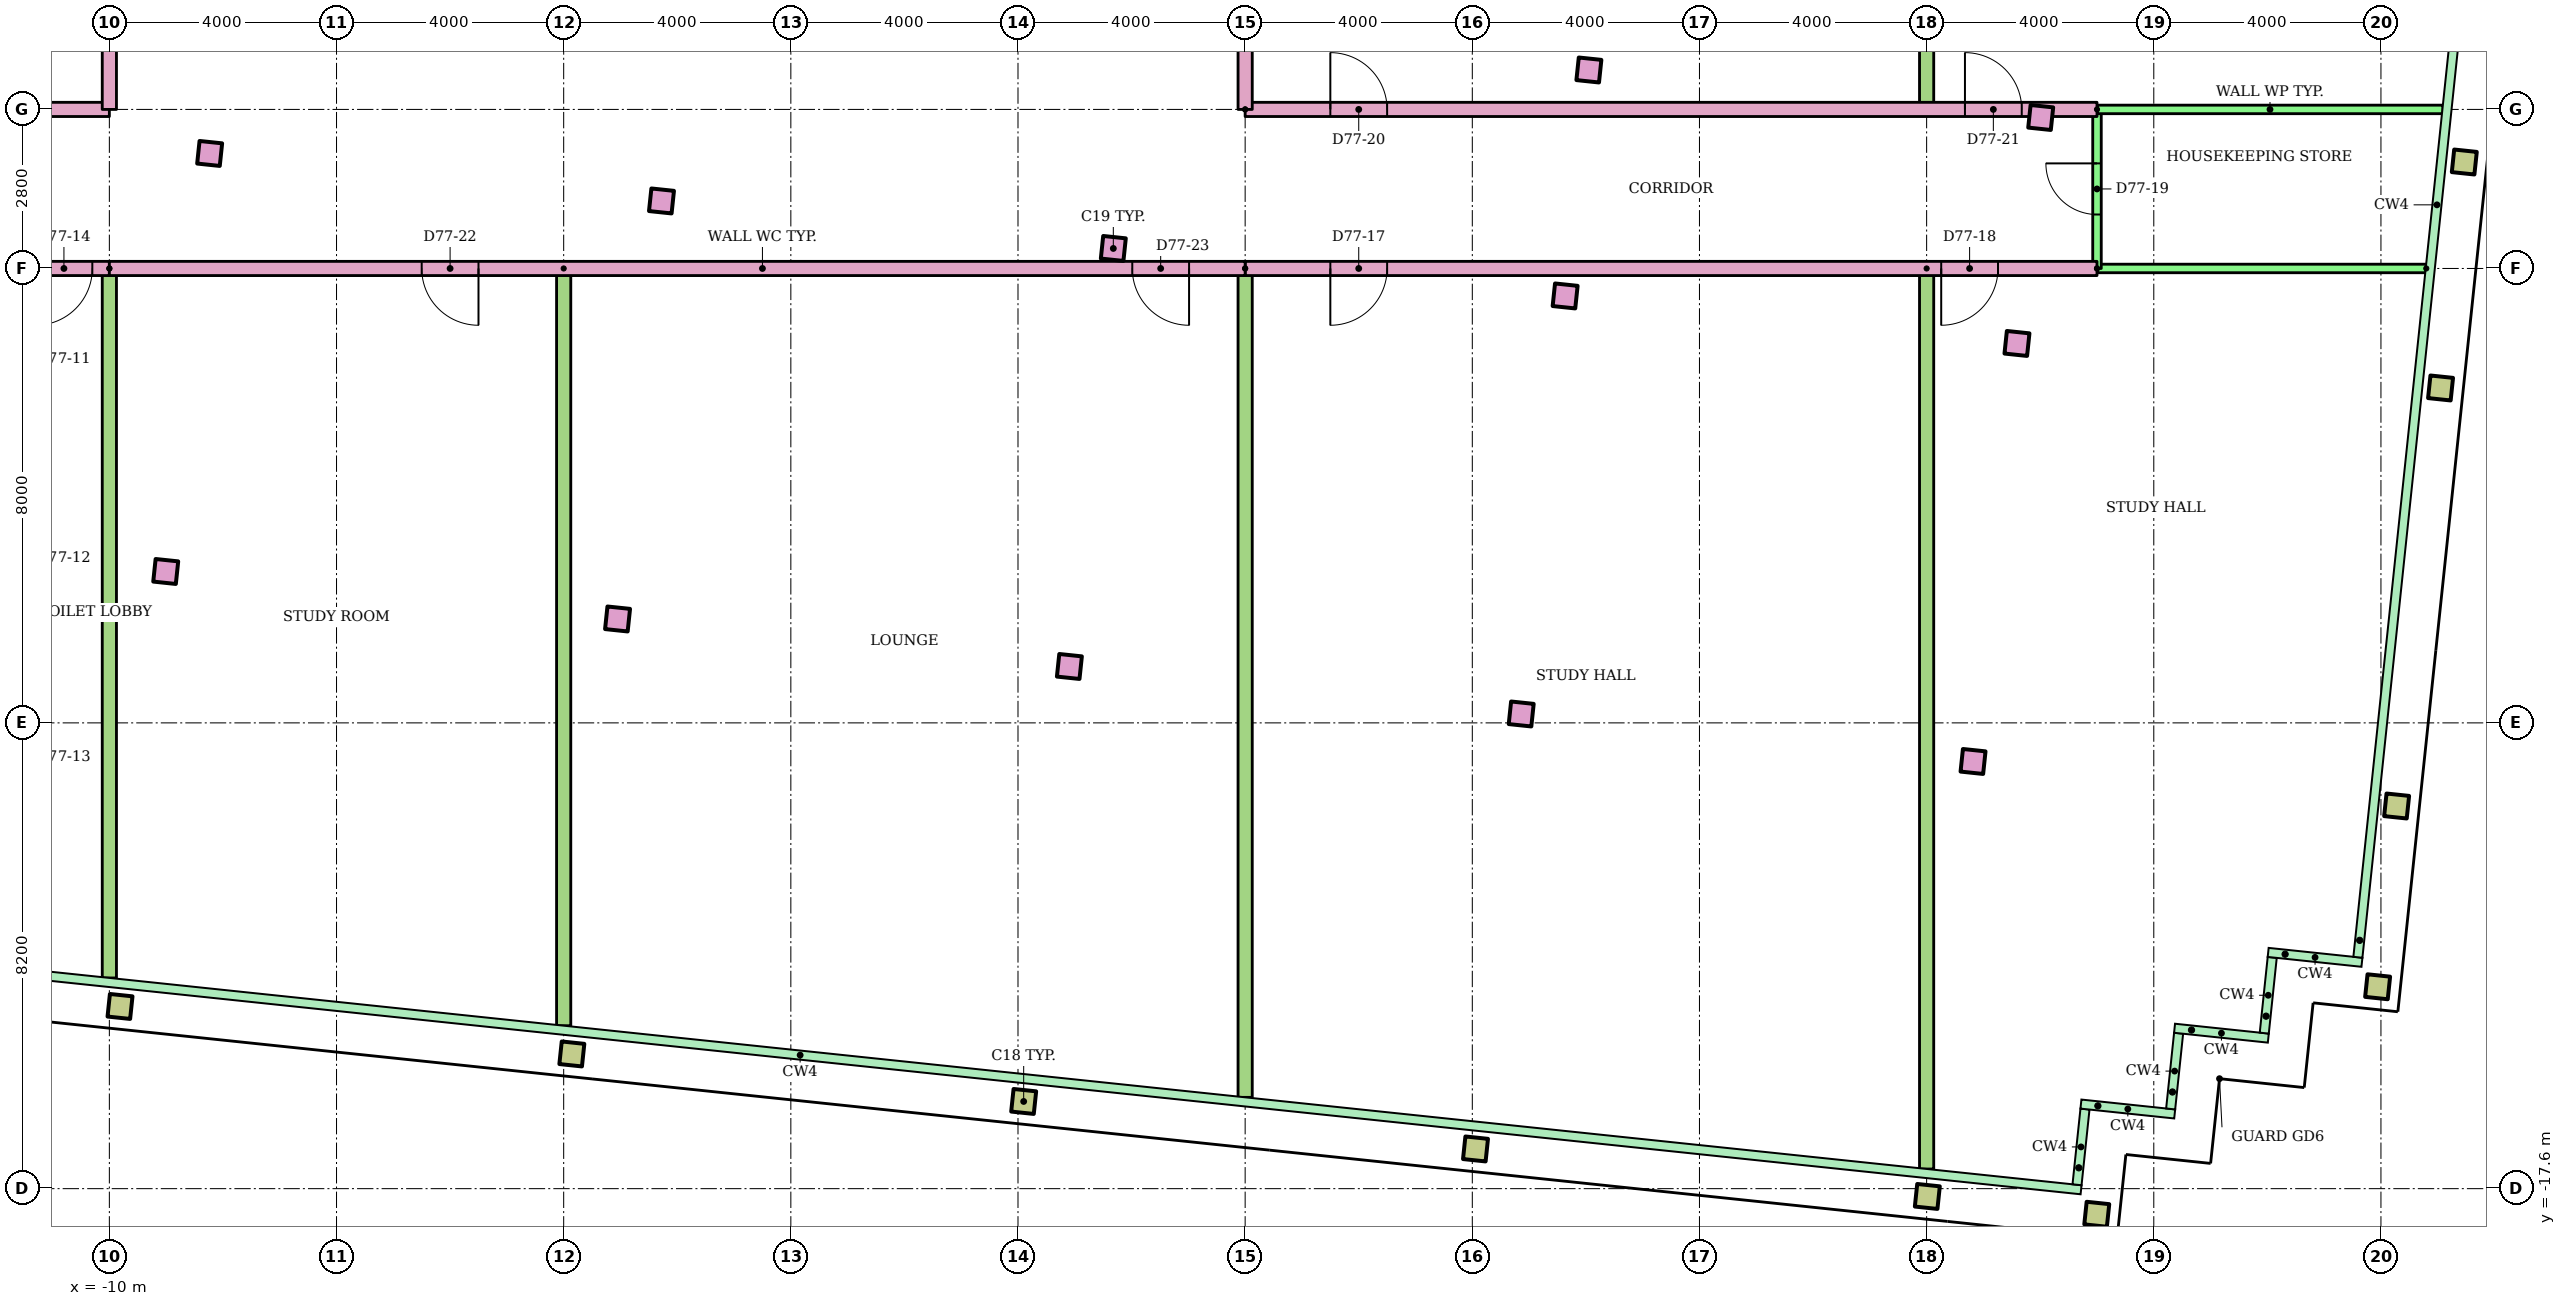
"""IFC4 building model, lengths in metres.
Left out: names, types, materials, properties, quantities, classifications, styles, units other than length and angle.
Written with IfcOpenShell. Run it as: python <this file> out.ifc"""

import sys

from ifc_helpers import new_model, si_unit, direction, frame, frame_2d, origin, origin_2d, place, context, subcontext, project, spatial, rectangle, hollow_rectangle, extrude, element, fill, save


model = new_model("IFC4")
c1 = context("Model", 3, precision=1e-05, world=origin(), true_north=direction((0.0, 1.0)))
c2 = subcontext(c1, "Body", "Model", "MODEL_VIEW")
j1 = project(units=[si_unit("LENGTHUNIT", "METRE"), si_unit("PLANEANGLEUNIT", "RADIAN")], contexts=[c1])
p1 = place(None, origin())
s1 = spatial("IfcSite", under=j1, at=p1, CompositionType="ELEMENT")
p2 = place(p1, origin())
s2 = spatial("IfcBuilding", under=s1, at=p2, CompositionType="ELEMENT")
p3 = place(p2, frame((0.0, 0.0, 298.3)))
s3 = spatial("IfcBuildingStorey", under=s2, at=p3, CompositionType="ELEMENT", Elevation=298.3)
for number, where, z_axis, x_axis in (
    (1, (-9.812, -14.392, 0.0), (0.0, 0.0, 1.0), (0.995, -0.105, 0.0)),
    (2, (-1.856, -15.229, 0.0), (0.0, 0.0, 1.0), (0.995, -0.105, 0.0)),
    (3, (6.1, -16.065, 0.0), (0.0, 0.0, 1.0), (0.995, -0.105, 0.0)),
    (4, (14.056, -16.901, 0.0), (0.0, 0.0, 1.0), (0.995, -0.105, 0.0)),
    (5, (22.012, -17.737, 0.0), (0.0, 0.0, 1.0), (0.995, -0.105, 0.0)),
    (6, (24.996, -18.051, 0.0), (0.0, 0.0, 1.0), (0.995, -0.105, 0.0)),
    (7, (29.942, -14.046, 0.0), (0.0, 0.0, 1.0), (0.995, -0.105, 0.0)),
):
    element("IfcColumn", number, at=place(p3, frame(where, z_axis=z_axis, x_axis=x_axis)), inside=s3, PredefinedType="COLUMN", context=c2, shape_type="SweptSolid", body=[
        extrude(hollow_rectangle(XDim=0.4, YDim=0.4, WallThickness=0.02, at=origin_2d()), origin(), (0.0, 0.0, 1.0), 3.4),
    ])
for number, where, z_axis, x_axis in (
    (8, (-9.007, -6.735, 0.0), (0.0, 0.0, 1.0), (0.995, -0.105, 0.0)),
    (9, (-1.051, -7.571, 0.0), (0.0, 0.0, 1.0), (0.995, -0.105, 0.0)),
    (10, (6.905, -8.407, 0.0), (0.0, 0.0, 1.0), (0.995, -0.105, 0.0)),
    (11, (14.861, -9.243, 0.0), (0.0, 0.0, 1.0), (0.995, -0.105, 0.0)),
    (12, (22.817, -10.08, 0.0), (0.0, 0.0, 1.0), (0.995, -0.105, 0.0)),
):
    element("IfcColumn", number, at=place(p3, frame(where, z_axis=z_axis, x_axis=x_axis)), inside=s3, PredefinedType="COLUMN", context=c2, shape_type="SweptSolid", body=[
        extrude(rectangle(XDim=0.4, YDim=0.4, at=origin_2d()), origin(), (0.0, 0.0, 1.0), 3.4),
    ])
p4 = place(p3, frame((30.276, -10.864, 0.0), z_axis=(0.0, 0.0, 1.0), x_axis=(0.994521895368, -0.104528463268, 0.0)))
e13 = element("IfcColumn", 13, at=p4, inside=s3, PredefinedType="COLUMN", context=c2, shape_type="SweptSolid", body=[
    extrude(hollow_rectangle(XDim=0.4, YDim=0.4, WallThickness=0.02, at=origin_2d()), origin(), (0.0, 0.0, 1.0), 3.4),
])
for number, where, z_axis, x_axis in (
    (14, (-8.234, 0.625, 0.0), (0.0, 0.0, 1.0), (0.995, -0.105, 0.0)),
    (15, (-0.278, -0.211, 0.0), (0.0, 0.0, 1.0), (0.995, -0.105, 0.0)),
    (16, (7.678, -1.048, 0.0), (0.0, 0.0, 1.0), (0.995, -0.105, 0.0)),
    (17, (15.635, -1.884, 0.0), (0.0, 0.0, 1.0), (0.995, -0.105, 0.0)),
    (18, (23.591, -2.72, 0.0), (0.0, 0.0, 1.0), (0.995, -0.105, 0.0)),
):
    element("IfcColumn", number, at=place(p3, frame(where, z_axis=z_axis, x_axis=x_axis)), inside=s3, PredefinedType="COLUMN", context=c2, shape_type="SweptSolid", body=[
        extrude(rectangle(XDim=0.4, YDim=0.4, at=origin_2d()), origin(), (0.0, 0.0, 1.0), 3.4),
    ])
p5 = place(p3, frame((31.05, -3.504, 0.0), z_axis=(0.0, 0.0, 1.0), x_axis=(0.994521895368, -0.104528463268, 0.0)))
e19 = element("IfcColumn", 19, at=p5, inside=s3, PredefinedType="COLUMN", context=c2, shape_type="SweptSolid", body=[
    extrude(hollow_rectangle(XDim=0.4, YDim=0.4, WallThickness=0.02, at=origin_2d()), origin(), (0.0, 0.0, 1.0), 3.4),
])
for number, where, z_axis, x_axis in (
    (20, (16.053, 2.094, 0.0), (0.0, 0.0, 1.0), (0.995, -0.105, 0.0)),
    (21, (24.009, 1.258, 0.0), (0.0, 0.0, 1.0), (0.995, -0.105, 0.0)),
):
    element("IfcColumn", number, at=place(p3, frame(where, z_axis=z_axis, x_axis=x_axis)), inside=s3, PredefinedType="COLUMN", context=c2, shape_type="SweptSolid", body=[
        extrude(rectangle(XDim=0.4, YDim=0.4, at=origin_2d()), origin(), (0.0, 0.0, 1.0), 3.4),
    ])
p6 = place(p3, frame((31.468, 0.474, 0.0), z_axis=(0.0, 0.0, 1.0), x_axis=(0.994521895368, -0.104528463268, 0.0)))
e22 = element("IfcColumn", 22, at=p6, inside=s3, PredefinedType="COLUMN", context=c2, shape_type="SweptSolid", body=[
    extrude(hollow_rectangle(XDim=0.4, YDim=0.4, WallThickness=0.02, at=origin_2d()), origin(), (0.0, 0.0, 1.0), 3.4),
])
p7 = place(p3, frame((-10.0, -1.4, 0.0), z_axis=(0.0, 0.0, 1.0), x_axis=(-1.0, 0.0, 0.0)))
e23 = element("IfcWall", 23, at=p7, inside=s3, PredefinedType="PARTITIONING", context=c2, shape_type="SweptSolid", body=[
    extrude(rectangle(XDim=12.0, YDim=0.25, at=frame_2d((6.0, 0.0))), origin(), (0.0, 0.0, 1.0), 2.6),
])
p8 = place(p7, frame((0.3, 0.0, 0.0)))
e24 = element("IfcOpeningElement", 24, at=p8, cuts=e23, PredefinedType="OPENING", context=c2, shape_type="SweptSolid", body=[
    extrude(rectangle(XDim=1.0, YDim=2.1, at=frame_2d((0.5, 1.05))), frame((0.0, 0.135, 0.0), z_axis=(0.0, -1.0, 0.0), x_axis=(1.0, 0.0, 0.0)), (0.0, 0.0, 1.0), 0.27),
])
p9 = place(p7, frame((5.5, 0.0, 0.0)))
e25 = element("IfcOpeningElement", 25, at=p9, cuts=e23, PredefinedType="OPENING", context=c2, shape_type="SweptSolid", body=[
    extrude(rectangle(XDim=1.0, YDim=2.1, at=frame_2d((0.5, 1.05))), frame((0.0, 0.135, 0.0), z_axis=(0.0, -1.0, 0.0), x_axis=(1.0, 0.0, 0.0)), (0.0, 0.0, 1.0), 0.27),
])
p10 = place(p3, frame((-10.0, -1.4, 0.0), z_axis=(0.0, 0.0, 1.0), x_axis=(0.0, -1.0, 0.0)))
e26 = element("IfcWall", 26, at=p10, inside=s3, PredefinedType="PARTITIONING", context=c2, shape_type="SweptSolid", body=[
    extrude(rectangle(XDim=12.491, YDim=0.25, at=frame_2d((6.246, 0.0))), origin(), (0.0, 0.0, 1.0), 2.6),
])
p11 = place(p3, frame((-22.0, 1.4, 0.0)))
e27 = element("IfcWall", 27, at=p11, inside=s3, PredefinedType="PARTITIONING", context=c2, shape_type="SweptSolid", body=[
    extrude(rectangle(XDim=12.0, YDim=0.25, at=frame_2d((6.0, 0.0))), origin(), (0.0, 0.0, 1.0), 2.6),
])
p12 = place(p11, frame((9.5, 0.0, 0.0)))
e28 = element("IfcOpeningElement", 28, at=p12, cuts=e27, PredefinedType="OPENING", context=c2, shape_type="SweptSolid", body=[
    extrude(rectangle(XDim=1.0, YDim=2.1, at=frame_2d((0.5, 1.05))), frame((0.0, 0.135, 0.0), z_axis=(0.0, -1.0, 0.0), x_axis=(1.0, 0.0, 0.0)), (0.0, 0.0, 1.0), 0.27),
])
p13 = place(p3, frame((25.0, -1.4, 0.0), z_axis=(0.0, 0.0, 1.0), x_axis=(-1.0, 0.0, 0.0)))
e29 = element("IfcWall", 29, at=p13, inside=s3, PredefinedType="PARTITIONING", context=c2, shape_type="SweptSolid", body=[
    extrude(rectangle(XDim=15.0, YDim=0.25, at=frame_2d((7.5, 0.0))), origin(), (0.0, 0.0, 1.0), 2.6),
])
p14 = place(p13, frame((12.5, 0.0, 0.0)))
e30 = element("IfcOpeningElement", 30, at=p14, cuts=e29, PredefinedType="OPENING", context=c2, shape_type="SweptSolid", body=[
    extrude(rectangle(XDim=1.0, YDim=2.1, at=frame_2d((0.5, 1.05))), frame((0.0, 0.135, 0.0), z_axis=(0.0, -1.0, 0.0), x_axis=(1.0, 0.0, 0.0)), (0.0, 0.0, 1.0), 0.27),
])
p15 = place(p13, frame((1.743, 0.0, 0.0)))
e31 = element("IfcOpeningElement", 31, at=p15, cuts=e29, PredefinedType="OPENING", context=c2, shape_type="SweptSolid", body=[
    extrude(rectangle(XDim=1.0, YDim=2.1, at=frame_2d((0.5, 1.05))), frame((0.0, 0.135, 0.0), z_axis=(0.0, -1.0, 0.0), x_axis=(1.0, 0.0, 0.0)), (0.0, 0.0, 1.0), 0.27),
])
p16 = place(p3, frame((30.798, -1.4, 0.0), z_axis=(0.0, 0.0, 1.0), x_axis=(-1.0, 0.0, 0.0)))
e32 = element("IfcWall", 32, at=p16, inside=s3, PredefinedType="PARTITIONING", context=c2, shape_type="SweptSolid", body=[
    extrude(rectangle(XDim=5.798, YDim=0.15, at=frame_2d((2.899, 0.0))), origin(), (0.0, 0.0, 1.0), 2.6),
])
p17 = place(p3, frame((25.0, -1.4, 0.0), z_axis=(0.0, 0.0, 1.0), x_axis=(0.0, 1.0, 0.0)))
e33 = element("IfcWall", 33, at=p17, inside=s3, PredefinedType="PARTITIONING", context=c2, shape_type="SweptSolid", body=[
    extrude(rectangle(XDim=2.8, YDim=0.15, at=frame_2d((1.4, 0.0))), origin(), (0.0, 0.0, 1.0), 2.6),
])
p18 = place(p17, frame((0.95, 0.0, 0.0)))
e34 = element("IfcOpeningElement", 34, at=p18, cuts=e33, PredefinedType="OPENING", context=c2, shape_type="SweptSolid", body=[
    extrude(rectangle(XDim=0.9, YDim=2.1, at=frame_2d((0.45, 1.05))), frame((0.0, 0.085, 0.0), z_axis=(0.0, -1.0, 0.0), x_axis=(1.0, 0.0, 0.0)), (0.0, 0.0, 1.0), 0.17),
])
p19 = place(p3, frame((10.0, -1.4, 0.0), z_axis=(0.0, 0.0, 1.0), x_axis=(0.0, -1.0, 0.0)))
e35 = element("IfcWall", 35, at=p19, inside=s3, PredefinedType="PARTITIONING", context=c2, shape_type="SweptSolid", body=[
    extrude(rectangle(XDim=14.593, YDim=0.25, at=frame_2d((7.297, 0.0))), origin(), (0.0, 0.0, 1.0), 2.6),
])
p20 = place(p3, frame((22.0, -1.4, 0.0), z_axis=(0.0, 0.0, 1.0), x_axis=(0.0, -1.0, 0.0)))
e36 = element("IfcWall", 36, at=p20, inside=s3, PredefinedType="PARTITIONING", context=c2, shape_type="SweptSolid", body=[
    extrude(rectangle(XDim=15.854, YDim=0.25, at=frame_2d((7.927, 0.0))), origin(), (0.0, 0.0, 1.0), 2.6),
])
p21 = place(p3, frame((10.0, 1.4, 0.0)))
e37 = element("IfcWall", 37, at=p21, inside=s3, PredefinedType="PARTITIONING", context=c2, shape_type="SweptSolid", body=[
    extrude(rectangle(XDim=15.0, YDim=0.25, at=frame_2d((7.5, 0.0))), origin(), (0.0, 0.0, 1.0), 2.6),
])
p22 = place(p21, frame((1.5, 0.0, 0.0)))
e38 = element("IfcOpeningElement", 38, at=p22, cuts=e37, PredefinedType="OPENING", context=c2, shape_type="SweptSolid", body=[
    extrude(rectangle(XDim=1.0, YDim=2.1, at=frame_2d((0.5, 1.05))), frame((0.0, 0.135, 0.0), z_axis=(0.0, -1.0, 0.0), x_axis=(1.0, 0.0, 0.0)), (0.0, 0.0, 1.0), 0.27),
])
p23 = place(p21, frame((12.675, 0.0, 0.0)))
e39 = element("IfcOpeningElement", 39, at=p23, cuts=e37, PredefinedType="OPENING", context=c2, shape_type="SweptSolid", body=[
    extrude(rectangle(XDim=1.0, YDim=2.1, at=frame_2d((0.5, 1.05))), frame((0.0, 0.135, 0.0), z_axis=(0.0, -1.0, 0.0), x_axis=(1.0, 0.0, 0.0)), (0.0, 0.0, 1.0), 0.27),
])
p24 = place(p3, frame((25.0, 1.4, 0.0)))
e40 = element("IfcWall", 40, at=p24, inside=s3, PredefinedType="PARTITIONING", context=c2, shape_type="SweptSolid", body=[
    extrude(rectangle(XDim=6.093, YDim=0.15, at=frame_2d((3.046, 0.0))), origin(), (0.0, 0.0, 1.0), 2.6),
])
p25 = place(p3, frame((22.0, 18.584, 0.0), z_axis=(0.0, 0.0, 1.0), x_axis=(0.0, -1.0, 0.0)))
e41 = element("IfcWall", 41, at=p25, inside=s3, PredefinedType="PARTITIONING", context=c2, shape_type="SweptSolid", body=[
    extrude(rectangle(XDim=17.184, YDim=0.25, at=frame_2d((8.592, 0.0))), origin(), (0.0, 0.0, 1.0), 2.6),
])
p26 = place(p3, frame((-2.0, -1.4, 0.0), z_axis=(0.0, 0.0, 1.0), x_axis=(0.0, -1.0, 0.0)))
e42 = element("IfcWall", 42, at=p26, inside=s3, PredefinedType="PARTITIONING", context=c2, shape_type="SweptSolid", body=[
    extrude(rectangle(XDim=13.332, YDim=0.25, at=frame_2d((6.666, 0.0))), origin(), (0.0, 0.0, 1.0), 2.6),
])
p27 = place(p3, frame((10.0, -1.4, 0.0), z_axis=(0.0, 0.0, 1.0), x_axis=(-1.0, 0.0, 0.0)))
e43 = element("IfcWall", 43, at=p27, inside=s3, PredefinedType="PARTITIONING", context=c2, shape_type="SweptSolid", body=[
    extrude(rectangle(XDim=20.0, YDim=0.25, at=frame_2d((10.0, 0.0))), origin(), (0.0, 0.0, 1.0), 2.6),
])
p28 = place(p27, frame((13.5, 0.0, 0.0)))
e44 = element("IfcOpeningElement", 44, at=p28, cuts=e43, PredefinedType="OPENING", context=c2, shape_type="SweptSolid", body=[
    extrude(rectangle(XDim=1.0, YDim=2.1, at=frame_2d((0.5, 1.05))), frame((0.0, 0.135, 0.0), z_axis=(0.0, -1.0, 0.0), x_axis=(1.0, 0.0, 0.0)), (0.0, 0.0, 1.0), 0.27),
])
p29 = place(p27, frame((0.988, 0.0, 0.0)))
e45 = element("IfcOpeningElement", 45, at=p29, cuts=e43, PredefinedType="OPENING", context=c2, shape_type="SweptSolid", body=[
    extrude(rectangle(XDim=1.0, YDim=2.1, at=frame_2d((0.5, 1.05))), frame((0.0, 0.135, 0.0), z_axis=(0.0, -1.0, 0.0), x_axis=(1.0, 0.0, 0.0)), (0.0, 0.0, 1.0), 0.27),
])
for number, where, z_axis, x_axis in (
    (46, (-10.0, 3.0, 0.0), (0.0, 0.0, 1.0), (0.0, -1.0, 0.0)),
    (47, (10.0, 1.4, 0.0), (0.0, 0.0, 1.0), (0.0, 1.0, 0.0)),
):
    element("IfcWall", number, at=place(p3, frame(where, z_axis=z_axis, x_axis=x_axis)), inside=s3, PredefinedType="PARTITIONING", context=c2, shape_type="SweptSolid", body=[
        extrude(rectangle(XDim=1.6, YDim=0.25, at=frame_2d((0.8, 0.0))), origin(), (0.0, 0.0, 1.0), 2.6),
    ])
p30 = place(p8, origin())
e48 = element("IfcDoor", 48, at=p30, inside=s3, OperationType="SINGLE_SWING_RIGHT", PredefinedType="DOOR", context=c2, shape_type="SweptSolid", body=[
    extrude(rectangle(XDim=1.0, YDim=2.1, at=frame_2d((0.5, 1.05))), frame((0.0, 0.025, 0.0), z_axis=(0.0, -1.0, 0.0), x_axis=(1.0, 0.0, 0.0)), (0.0, 0.0, 1.0), 0.05),
])
fill(e24, e48)
p31 = place(p14, origin())
e49 = element("IfcDoor", 49, at=p31, inside=s3, OperationType="SINGLE_SWING_RIGHT", PredefinedType="DOOR", context=c2, shape_type="SweptSolid", body=[
    extrude(rectangle(XDim=1.0, YDim=2.1, at=frame_2d((0.5, 1.05))), frame((0.0, 0.025, 0.0), z_axis=(0.0, -1.0, 0.0), x_axis=(1.0, 0.0, 0.0)), (0.0, 0.0, 1.0), 0.05),
])
fill(e30, e49)
p32 = place(p15, origin())
e50 = element("IfcDoor", 50, at=p32, inside=s3, OperationType="SINGLE_SWING_RIGHT", PredefinedType="DOOR", context=c2, shape_type="SweptSolid", body=[
    extrude(rectangle(XDim=1.0, YDim=2.1, at=frame_2d((0.5, 1.05))), frame((0.0, 0.025, 0.0), z_axis=(0.0, -1.0, 0.0), x_axis=(1.0, 0.0, 0.0)), (0.0, 0.0, 1.0), 0.05),
])
fill(e31, e50)
p33 = place(p18, origin())
e51 = element("IfcDoor", 51, at=p33, inside=s3, OperationType="SINGLE_SWING_RIGHT", PredefinedType="DOOR", context=c2, shape_type="SweptSolid", body=[
    extrude(rectangle(XDim=0.9, YDim=2.1, at=frame_2d((0.45, 1.05))), frame((0.0, 0.025, 0.0), z_axis=(0.0, -1.0, 0.0), x_axis=(1.0, 0.0, 0.0)), (0.0, 0.0, 1.0), 0.05),
])
fill(e34, e51)
p34 = place(p22, origin())
e52 = element("IfcDoor", 52, at=p34, inside=s3, OperationType="SINGLE_SWING_LEFT", PredefinedType="DOOR", context=c2, shape_type="SweptSolid", body=[
    extrude(rectangle(XDim=1.0, YDim=2.1, at=frame_2d((0.5, 1.05))), frame((0.0, 0.025, 0.0), z_axis=(0.0, -1.0, 0.0), x_axis=(1.0, 0.0, 0.0)), (0.0, 0.0, 1.0), 0.05),
])
fill(e38, e52)
p35 = place(p23, origin())
e53 = element("IfcDoor", 53, at=p35, inside=s3, OperationType="SINGLE_SWING_LEFT", PredefinedType="DOOR", context=c2, shape_type="SweptSolid", body=[
    extrude(rectangle(XDim=1.0, YDim=2.1, at=frame_2d((0.5, 1.05))), frame((0.0, 0.025, 0.0), z_axis=(0.0, -1.0, 0.0), x_axis=(1.0, 0.0, 0.0)), (0.0, 0.0, 1.0), 0.05),
])
fill(e39, e53)
p36 = place(p28, origin())
e54 = element("IfcDoor", 54, at=p36, inside=s3, OperationType="SINGLE_SWING_LEFT", PredefinedType="DOOR", context=c2, shape_type="SweptSolid", body=[
    extrude(rectangle(XDim=1.0, YDim=2.1, at=frame_2d((0.5, 1.05))), frame((0.0, 0.025, 0.0), z_axis=(0.0, -1.0, 0.0), x_axis=(1.0, 0.0, 0.0)), (0.0, 0.0, 1.0), 0.05),
])
fill(e44, e54)
p37 = place(p29, origin())
e55 = element("IfcDoor", 55, at=p37, inside=s3, OperationType="SINGLE_SWING_LEFT", PredefinedType="DOOR", context=c2, shape_type="SweptSolid", body=[
    extrude(rectangle(XDim=1.0, YDim=2.1, at=frame_2d((0.5, 1.05))), frame((0.0, 0.025, 0.0), z_axis=(0.0, -1.0, 0.0), x_axis=(1.0, 0.0, 0.0)), (0.0, 0.0, 1.0), 0.05),
])
fill(e45, e55)
save(model, sys.argv[1])
